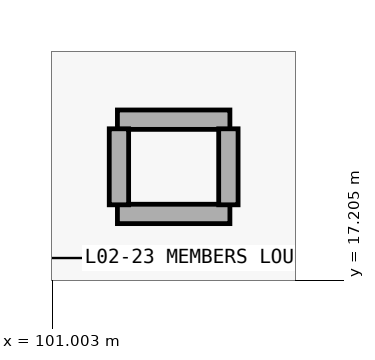
"""IFC4 building model, lengths in metres.
Left out: names, types, materials, properties, quantities, classifications, styles, units other than length and angle.
Written with IfcOpenShell. Run it as: python <this file> out.ifc"""

import sys

from ifc_helpers import new_model, si_unit, direction, frame, frame_2d, origin, place, context, subcontext, project, spatial, rectangle, extrude, element, save


model = new_model("IFC4")
c1 = context("Model", 3, precision=1e-05, world=origin(), true_north=direction((0.0, 1.0)))
c2 = subcontext(c1, "Body", "Model", "MODEL_VIEW")
j1 = project(units=[si_unit("LENGTHUNIT", "METRE"), si_unit("PLANEANGLEUNIT", "RADIAN")], contexts=[c1])
p1 = place(None, origin())
s1 = spatial("IfcSite", under=j1, at=p1, CompositionType="ELEMENT")
p2 = place(p1, origin())
s2 = spatial("IfcBuilding", under=s1, at=p2, CompositionType="ELEMENT")
p3 = place(p2, frame((0.0, 0.0, 10.5)))
s3 = spatial("IfcBuildingStorey", under=s2, at=p3, CompositionType="ELEMENT", Elevation=10.5)
for number, where, z_axis, x_axis in (
    (1, (101.86, 19.32, 0.0), (0.0, 0.0, 1.0), (1.0, 0.0, 0.0)),
    (2, (101.86, 18.08, 0.0), (0.0, 0.0, 1.0), (1.0, 0.0, 0.0)),
):
    element("IfcWall", number, at=place(p3, frame(where, z_axis=z_axis, x_axis=x_axis)), inside=s3, PredefinedType="PARTITIONING", context=c2, shape_type="SweptSolid", body=[
        extrude(rectangle(XDim=1.48, YDim=0.255, at=frame_2d((0.74, 0.0))), origin(), (0.0, 0.0, 1.0), 4.72),
    ])
for number, where, z_axis, x_axis in (
    (3, (101.88, 18.2, 0.0), (0.0, 0.0, 1.0), (0.0, 1.0, 0.0)),
    (4, (103.32, 18.2, 0.0), (0.0, 0.0, 1.0), (0.0, 1.0, 0.0)),
):
    element("IfcWall", number, at=place(p3, frame(where, z_axis=z_axis, x_axis=x_axis)), inside=s3, PredefinedType="PARTITIONING", context=c2, shape_type="SweptSolid", body=[
        extrude(rectangle(XDim=1.0, YDim=0.255, at=frame_2d((0.5, 0.0))), origin(), (0.0, 0.0, 1.0), 4.72),
    ])
save(model, sys.argv[1])
